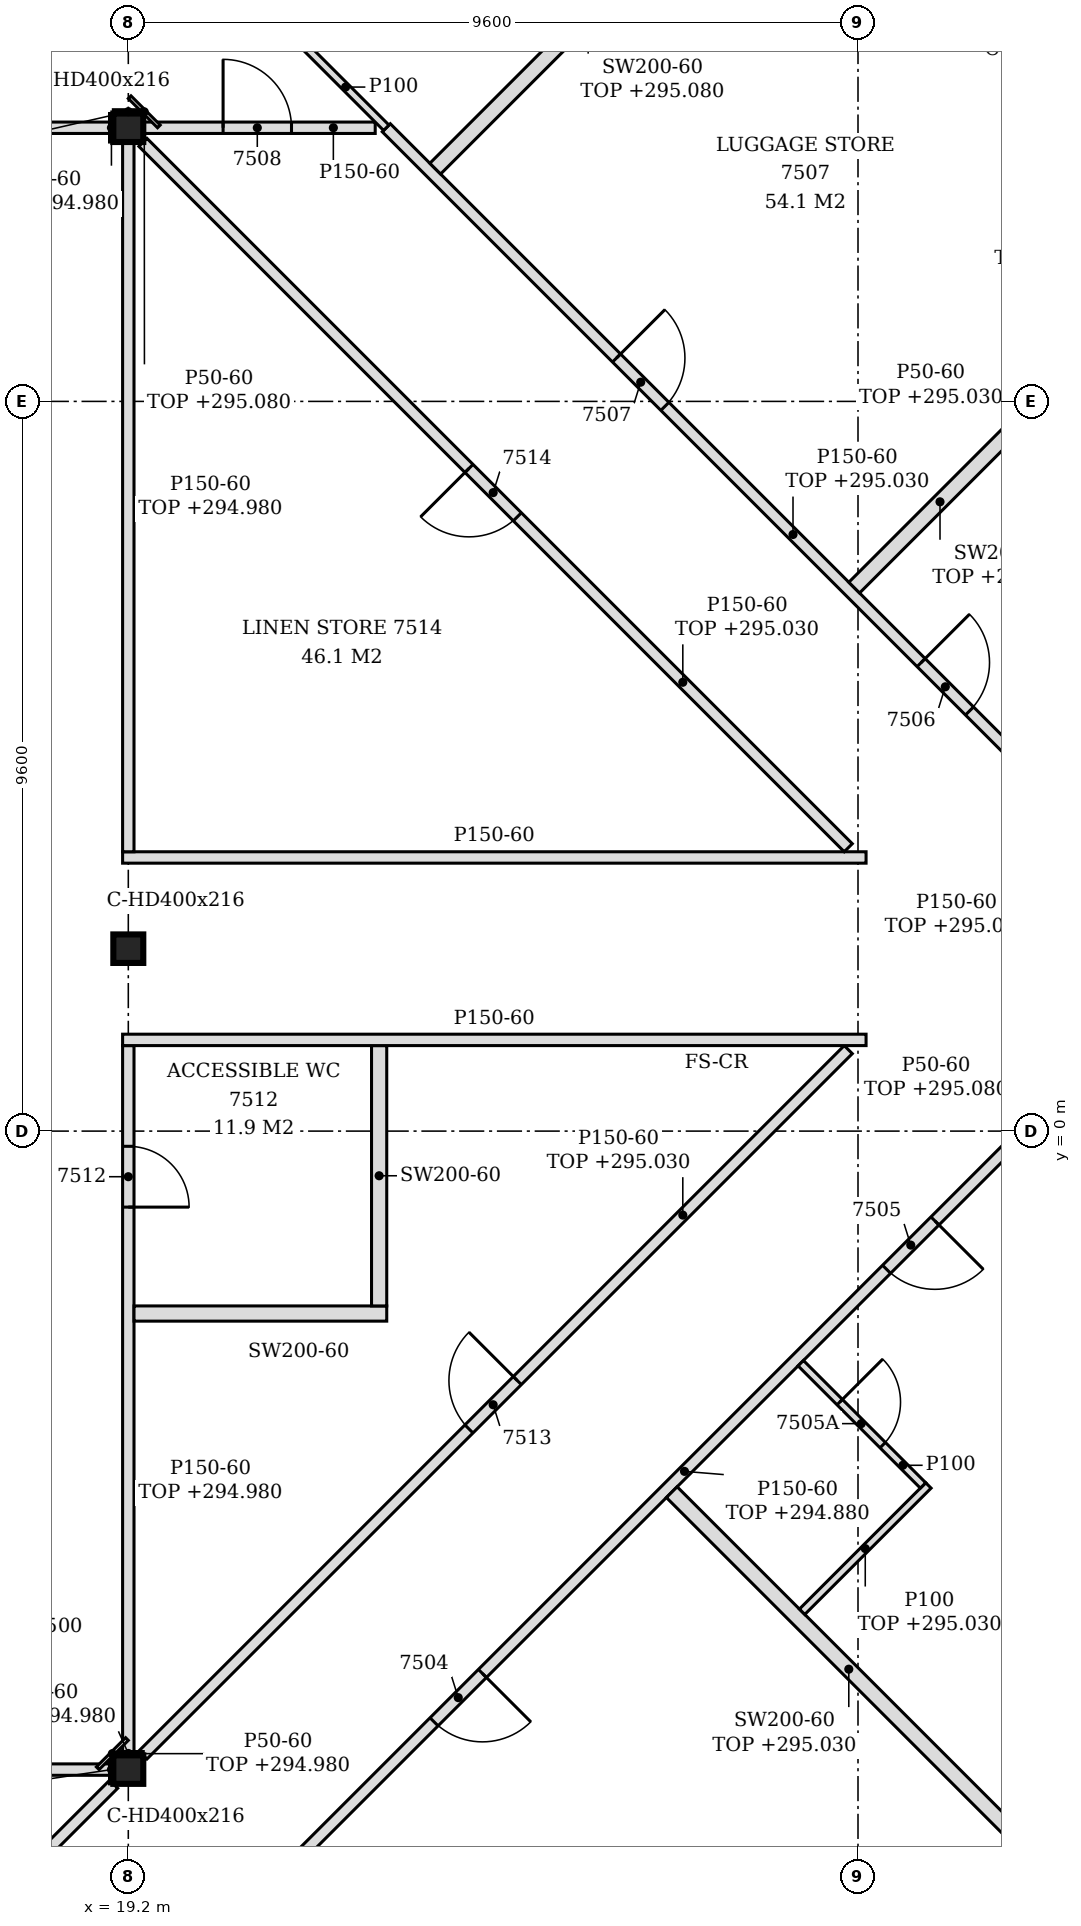
"""IFC4 building model, lengths in metres.
Left out: names, types, materials, properties, quantities, classifications, styles, units other than length and angle.
Written with IfcOpenShell. Run it as: python <this file> out.ifc"""

import sys

from ifc_helpers import new_model, si_unit, direction, frame, frame_2d, origin, origin_2d, place, context, subcontext, project, spatial, polyline, rectangle, i_section, outline, extrude, element, fill, save


model = new_model("IFC4")
c1 = context("Model", 3, precision=1e-05, world=origin(), true_north=direction((0.0, 1.0)))
c2 = subcontext(c1, "Body", "Model", "MODEL_VIEW")
j1 = project(units=[si_unit("LENGTHUNIT", "METRE"), si_unit("PLANEANGLEUNIT", "RADIAN")], contexts=[c1])
p1 = place(None, origin())
s1 = spatial("IfcSite", under=j1, at=p1, CompositionType="ELEMENT")
p2 = place(p1, origin())
s2 = spatial("IfcBuilding", under=s1, at=p2, CompositionType="ELEMENT")
p3 = place(p2, frame((0.0, 0.0, 292.2)))
s3 = spatial("IfcBuildingStorey", under=s2, at=p3, CompositionType="ELEMENT", Elevation=292.2)
for number, where, z_axis, x_axis in (
    (1, (19.2, -8.4, -0.15), (0.0, 0.0, 1.0), (1.0, 0.0, 0.0)),
    (2, (19.2, 2.4, -0.15), (0.0, 0.0, 1.0), (1.0, 0.0, 0.0)),
    (3, (19.2, 13.2, -0.15), (0.0, 0.0, 1.0), (1.0, 0.0, 0.0)),
):
    element("IfcColumn", number, at=place(p3, frame(where, z_axis=z_axis, x_axis=x_axis)), inside=s3, PredefinedType="COLUMN", context=c2, shape_type="SweptSolid", body=[
        extrude(i_section(OverallWidth=0.394, OverallDepth=0.375, WebThickness=0.017, FlangeThickness=0.028, FilletRadius=0.015, at=origin_2d()), origin(), (0.0, 0.0, 1.0), 3.55),
    ])
p4 = place(p3, frame((16.722, -14.272, 0.0), z_axis=(0.0, 0.0, 1.0), x_axis=(0.707106781187, 0.707106781187, 0.0)))
e4 = element("IfcWall", 4, at=p4, inside=s3, PredefinedType="PARTITIONING", context=c2, shape_type="SweptSolid", body=[
    extrude(rectangle(XDim=20.058, YDim=0.15, at=frame_2d((10.029, 0.0))), origin(), (0.0, 0.0, 1.0), 2.68),
])
p5 = place(p4, frame((3.195, 0.0, 0.0)))
e5 = element("IfcOpeningElement", 5, at=p5, cuts=e4, PredefinedType="OPENING", context=c2, shape_type="SweptSolid", body=[
    extrude(rectangle(XDim=0.9, YDim=2.1, at=frame_2d((0.45, 1.05))), frame((0.0, 0.085, 0.0), z_axis=(0.0, -1.0, 0.0), x_axis=(1.0, 0.0, 0.0)), (0.0, 0.0, 1.0), 0.17),
])
p6 = place(p4, frame((9.193, 0.0, 0.0)))
e6 = element("IfcOpeningElement", 6, at=p6, cuts=e4, PredefinedType="OPENING", context=c2, shape_type="SweptSolid", body=[
    extrude(rectangle(XDim=0.9, YDim=2.1, at=frame_2d((0.45, 1.05))), frame((0.0, 0.085, 0.0), z_axis=(0.0, -1.0, 0.0), x_axis=(1.0, 0.0, 0.0)), (0.0, 0.0, 1.0), 0.17),
])
p7 = place(p4, frame((17.613, 0.0, 0.0)))
e7 = element("IfcOpeningElement", 7, at=p7, cuts=e4, PredefinedType="OPENING", context=c2, shape_type="SweptSolid", body=[
    extrude(rectangle(XDim=0.9, YDim=2.1, at=frame_2d((0.45, 1.05))), frame((0.0, 0.085, 0.0), z_axis=(0.0, -1.0, 0.0), x_axis=(1.0, 0.0, 0.0)), (0.0, 0.0, 1.0), 0.17),
])
p8 = place(p3, frame((15.728, -11.872, 0.0), z_axis=(0.0, 0.0, 1.0), x_axis=(0.707106781187, 0.707106781187, 0.0)))
e8 = element("IfcWall", 8, at=p8, inside=s3, PredefinedType="PARTITIONING", context=c2, shape_type="SweptSolid", body=[
    extrude(rectangle(XDim=4.638, YDim=0.15, at=frame_2d((2.319, 0.0))), origin(), (0.0, 0.0, 1.0), 3.4),
])
p9 = place(p3, frame((31.008, -9.408, 0.0), z_axis=(0.0, 0.0, 1.0), x_axis=(-0.707106781187, 0.707106781187, 0.0)))
e9 = element("IfcWall", 9, at=p9, inside=s3, PredefinedType="PARTITIONING", context=c2, shape_type="SweptSolid", body=[
    extrude(rectangle(XDim=6.587, YDim=0.2, at=frame_2d((3.293, 0.0))), origin(), (0.0, 0.0, 1.0), 2.83),
])
p10 = place(p3, frame((7.397, -8.4, 0.0), z_axis=(0.0, 0.0, 1.0), x_axis=(1.0, 0.0, 0.0)))
e10 = element("IfcWall", 10, at=p10, inside=s3, PredefinedType="PARTITIONING", context=c2, shape_type="SweptSolid", body=[
    extrude(rectangle(XDim=11.606, YDim=0.15, at=frame_2d((5.803, 0.0))), origin(), (0.0, 0.0, 1.0), 2.78),
])
p11 = place(p10, frame((5.353, 0.0, 0.0)))
e11 = element("IfcOpeningElement", 11, at=p11, cuts=e10, PredefinedType="OPENING", context=c2, shape_type="SweptSolid", body=[
    extrude(rectangle(XDim=0.9, YDim=2.1, at=frame_2d((0.45, 1.05))), frame((0.0, 0.085, 0.0), z_axis=(0.0, -1.0, 0.0), x_axis=(1.0, 0.0, 0.0)), (0.0, 0.0, 1.0), 0.17),
])
p12 = place(p3, frame((19.2, -8.212, 0.0), z_axis=(0.0, 0.0, 1.0), x_axis=(0.0, 1.0, 0.0)))
e12 = element("IfcWall", 12, at=p12, inside=s3, PredefinedType="PARTITIONING", context=c2, shape_type="SweptSolid", body=[
    extrude(rectangle(XDim=9.337, YDim=0.15, at=frame_2d((4.669, 0.0))), origin(), (0.0, 0.0, 1.0), 2.78),
])
p13 = place(p12, frame((7.213, 0.0, 0.0)))
e13 = element("IfcOpeningElement", 13, at=p13, cuts=e12, PredefinedType="OPENING", context=c2, shape_type="SweptSolid", body=[
    extrude(rectangle(XDim=0.8, YDim=2.1, at=frame_2d((0.4, 1.05))), frame((0.0, 0.085, 0.0), z_axis=(0.0, -1.0, 0.0), x_axis=(1.0, 0.0, 0.0)), (0.0, 0.0, 1.0), 0.17),
])
p14 = place(p3, frame((19.392, -8.208, 0.0), z_axis=(0.0, 0.0, 1.0), x_axis=(0.707106781187, 0.707106781187, 0.0)))
e14 = element("IfcWall", 14, at=p14, inside=s3, PredefinedType="PARTITIONING", context=c2, shape_type="SweptSolid", body=[
    extrude(rectangle(XDim=13.124, YDim=0.15, at=frame_2d((6.562, 0.0))), origin(), (0.0, 0.0, 1.0), 2.83),
])
p15 = place(p14, frame((6.066, 0.0, 0.0)))
e15 = element("IfcOpeningElement", 15, at=p15, cuts=e14, PredefinedType="OPENING", context=c2, shape_type="SweptSolid", body=[
    extrude(rectangle(XDim=0.9, YDim=2.1, at=frame_2d((0.45, 1.05))), frame((0.0, 0.085, 0.0), z_axis=(0.0, -1.0, 0.0), x_axis=(1.0, 0.0, 0.0)), (0.0, 0.0, 1.0), 0.17),
])
p16 = place(p3, frame((28.065, -6.323, 0.0), z_axis=(0.0, 0.0, 1.0), x_axis=(0.707106781187, 0.707106781187, 0.0)))
e16 = element("IfcWall", 16, at=p16, inside=s3, PredefinedType="PARTITIONING", context=c2, shape_type="SweptSolid", body=[
    extrude(rectangle(XDim=2.35, YDim=0.1, at=frame_2d((1.175, 0.0))), origin(), (0.0, 0.0, 1.0), 2.83),
])
p17 = place(p3, frame((29.656, -4.662, 0.0), z_axis=(0.0, 0.0, 1.0), x_axis=(-0.707053116953, 0.707160441348, 0.0)))
e17 = element("IfcWall", 17, at=p17, inside=s3, PredefinedType="PARTITIONING", context=c2, shape_type="SweptSolid", body=[
    extrude(rectangle(XDim=2.275, YDim=0.1, at=frame_2d((1.137, 0.0))), origin(), (0.0, 0.0, 1.0), 3.4),
])
p18 = place(p17, frame((0.75, 0.0, 0.0)))
e18 = element("IfcOpeningElement", 18, at=p18, cuts=e17, PredefinedType="OPENING", context=c2, shape_type="SweptSolid", body=[
    extrude(rectangle(XDim=0.8, YDim=2.1, at=frame_2d((0.4, 1.05))), frame((0.0, 0.06, 0.0), z_axis=(0.0, -1.0, 0.0), x_axis=(1.0, 0.0, 0.0)), (0.0, 0.0, 1.0), 0.12),
])
p19 = place(p3, frame((19.275, -2.4, 0.0), z_axis=(0.0, 0.0, 1.0), x_axis=(1.0, 0.0, 0.0)))
e19 = element("IfcWall", 19, at=p19, inside=s3, PredefinedType="PARTITIONING", context=c2, shape_type="SweptSolid", body=[
    extrude(outline(polyline([(0.0, 0.0), (3.325, 0.0), (3.325, 3.4), (0.075, 3.4), (0.073, 2.78), (0.0, 2.78), (0.0, 0.0)])), frame((0.0, 0.1, 0.0), z_axis=(0.0, -1.0, 0.0), x_axis=(1.0, 0.0, 0.0)), (0.0, 0.0, 1.0), 0.2),
])
p20 = place(p3, frame((22.5, -2.3, 0.0), z_axis=(0.0, 0.0, 1.0), x_axis=(0.0, 1.0, 0.0)))
e20 = element("IfcWall", 20, at=p20, inside=s3, PredefinedType="PARTITIONING", context=c2, shape_type="SweptSolid", body=[
    extrude(outline(polyline([(0.0, 0.0), (3.425, 0.0), (3.425, 3.4), (2.405, 3.4), (2.403, 2.83), (2.195, 2.83), (2.193, 3.4), (0.0, 3.4), (0.0, 0.0)])), frame((0.0, 0.1, 0.0), z_axis=(0.0, -1.0, 0.0), x_axis=(1.0, 0.0, 0.0)), (0.0, 0.0, 1.0), 0.2),
])
for number, where, z_axis, x_axis in (
    (21, (19.125, 1.2, 0.0), (0.0, 0.0, 1.0), (1.0, 0.0, 0.0)),
    (22, (19.125, 3.6, 0.0), (0.0, 0.0, 1.0), (1.0, 0.0, 0.0)),
):
    element("IfcWall", number, at=place(p3, frame(where, z_axis=z_axis, x_axis=x_axis)), inside=s3, PredefinedType="PARTITIONING", context=c2, shape_type="SweptSolid", body=[
        extrude(outline(polyline([(0.0, 0.0), (9.781, 0.0), (9.781, 3.4), (0.225, 3.4), (0.223, 2.78), (0.0, 2.78), (0.0, 0.0)])), frame((0.0, 0.075, 0.0), z_axis=(0.0, -1.0, 0.0), x_axis=(1.0, 0.0, 0.0)), (0.0, 0.0, 1.0), 0.15),
    ])
p21 = place(p3, frame((19.2, 3.675, 0.0), z_axis=(0.0, 0.0, 1.0), x_axis=(0.0, 1.0, 0.0)))
e23 = element("IfcWall", 23, at=p21, inside=s3, PredefinedType="PARTITIONING", context=c2, shape_type="SweptSolid", body=[
    extrude(rectangle(XDim=9.337, YDim=0.15, at=frame_2d((4.669, 0.0))), origin(), (0.0, 0.0, 1.0), 2.78),
])
p22 = place(p3, frame((28.672, 3.728, 0.0), z_axis=(0.0, 0.0, 1.0), x_axis=(-0.707106781187, 0.707106781187, 0.0)))
e24 = element("IfcWall", 24, at=p22, inside=s3, PredefinedType="PARTITIONING", context=c2, shape_type="SweptSolid", body=[
    extrude(rectangle(XDim=13.124, YDim=0.15, at=frame_2d((6.562, 0.0))), origin(), (0.0, 0.0, 1.0), 2.83),
])
p23 = place(p22, frame((6.157, 0.0, 0.0)))
e25 = element("IfcOpeningElement", 25, at=p23, cuts=e24, PredefinedType="OPENING", context=c2, shape_type="SweptSolid", body=[
    extrude(rectangle(XDim=0.9, YDim=2.1, at=frame_2d((0.45, 1.05))), frame((0.0, 0.085, 0.0), z_axis=(0.0, -1.0, 0.0), x_axis=(1.0, 0.0, 0.0)), (0.0, 0.0, 1.0), 0.17),
])
p24 = place(p3, frame((31.072, 4.722, 0.0), z_axis=(0.0, 0.0, 1.0), x_axis=(-0.707106781187, 0.707106781187, 0.0)))
e26 = element("IfcWall", 26, at=p24, inside=s3, PredefinedType="PARTITIONING", context=c2, shape_type="SweptSolid", body=[
    extrude(rectangle(XDim=11.99, YDim=0.15, at=frame_2d((5.995, 0.0))), origin(), (0.0, 0.0, 1.0), 2.83),
])
p25 = place(p24, frame((1.139, 0.0, 0.0)))
e27 = element("IfcOpeningElement", 27, at=p25, cuts=e26, PredefinedType="OPENING", context=c2, shape_type="SweptSolid", body=[
    extrude(rectangle(XDim=0.9, YDim=2.1, at=frame_2d((0.45, 1.05))), frame((0.0, 0.085, 0.0), z_axis=(0.0, -1.0, 0.0), x_axis=(1.0, 0.0, 0.0)), (0.0, 0.0, 1.0), 0.17),
])
p26 = place(p24, frame((6.806, 0.0, 0.0)))
e28 = element("IfcOpeningElement", 28, at=p26, cuts=e26, PredefinedType="OPENING", context=c2, shape_type="SweptSolid", body=[
    extrude(rectangle(XDim=0.9, YDim=2.1, at=frame_2d((0.45, 1.05))), frame((0.0, 0.085, 0.0), z_axis=(0.0, -1.0, 0.0), x_axis=(1.0, 0.0, 0.0)), (0.0, 0.0, 1.0), 0.17),
])
p27 = place(p3, frame((28.75, 7.15, 0.0), z_axis=(0.0, 0.0, 1.0), x_axis=(0.707106781187, 0.707106781187, 0.0)))
e29 = element("IfcWall", 29, at=p27, inside=s3, PredefinedType="PARTITIONING", context=c2, shape_type="SweptSolid", body=[
    extrude(rectangle(XDim=3.193, YDim=0.2, at=frame_2d((1.597, 0.0))), origin(), (0.0, 0.0, 1.0), 2.88),
])
p28 = place(p3, frame((23.238, 12.662, 0.0), z_axis=(0.0, 0.0, 1.0), x_axis=(0.707106781187, 0.707106781187, 0.0)))
e30 = element("IfcWall", 30, at=p28, inside=s3, PredefinedType="PARTITIONING", context=c2, shape_type="SweptSolid", body=[
    extrude(rectangle(XDim=5.69, YDim=0.2, at=frame_2d((2.845, 0.0))), origin(), (0.0, 0.0, 1.0), 2.88),
])
p29 = place(p3, frame((7.397, 13.2, 0.0), z_axis=(0.0, 0.0, 1.0), x_axis=(1.0, 0.0, 0.0)))
e31 = element("IfcWall", 31, at=p29, inside=s3, PredefinedType="PARTITIONING", context=c2, shape_type="SweptSolid", body=[
    extrude(rectangle(XDim=11.606, YDim=0.15, at=frame_2d((5.803, 0.0))), origin(), (0.0, 0.0, 1.0), 2.78),
])
p30 = place(p29, frame((4.103, 0.0, 0.0)))
e32 = element("IfcOpeningElement", 32, at=p30, cuts=e31, PredefinedType="OPENING", context=c2, shape_type="SweptSolid", body=[
    extrude(rectangle(XDim=1.8, YDim=2.1, at=frame_2d((0.9, 1.05))), frame((0.0, 0.085, 0.0), z_axis=(0.0, -1.0, 0.0), x_axis=(1.0, 0.0, 0.0)), (0.0, 0.0, 1.0), 0.17),
])
p31 = place(p29, frame((6.053, 0.0, 0.0)))
e33 = element("IfcOpeningElement", 33, at=p31, cuts=e31, PredefinedType="OPENING", context=c2, shape_type="SweptSolid", body=[
    extrude(rectangle(XDim=1.0, YDim=2.1, at=frame_2d((0.5, 1.05))), frame((0.0, 0.085, 0.0), z_axis=(0.0, -1.0, 0.0), x_axis=(1.0, 0.0, 0.0)), (0.0, 0.0, 1.0), 0.17),
])
p32 = place(p3, frame((19.397, 13.2, 0.0), z_axis=(0.0, 0.0, 1.0), x_axis=(1.0, 0.0, 0.0)))
e34 = element("IfcWall", 34, at=p32, inside=s3, PredefinedType="PARTITIONING", context=c2, shape_type="SweptSolid", body=[
    extrude(rectangle(XDim=3.051, YDim=0.15, at=frame_2d((1.526, 0.0))), origin(), (0.0, 0.0, 1.0), 3.4),
])
p33 = place(p32, frame((1.05, 0.0, 0.0)))
e35 = element("IfcOpeningElement", 35, at=p33, cuts=e34, PredefinedType="OPENING", context=c2, shape_type="SweptSolid", body=[
    extrude(rectangle(XDim=0.9, YDim=2.1, at=frame_2d((0.45, 1.05))), frame((0.0, 0.085, 0.0), z_axis=(0.0, -1.0, 0.0), x_axis=(1.0, 0.0, 0.0)), (0.0, 0.0, 1.0), 0.17),
])
p34 = place(p3, frame((22.594, 13.2, 0.0), z_axis=(0.0, 0.0, 1.0), x_axis=(-0.707106781187, 0.707106781187, 0.0)))
e36 = element("IfcWall", 36, at=p34, inside=s3, PredefinedType="PARTITIONING", context=c2, shape_type="SweptSolid", body=[
    extrude(rectangle(XDim=1.514, YDim=0.1, at=frame_2d((0.757, 0.0))), origin(), (0.0, 0.0, 1.0), 3.4),
])
p35 = place(p3, frame((18.798, -8.382, 0.0), z_axis=(0.0, 0.0, 1.0), x_axis=(0.707106781187, 0.707106781187, 0.0)))
e37 = element("IfcWall", 37, at=p35, inside=s3, PredefinedType="PARTITIONING", context=c2, shape_type="SweptSolid", body=[
    extrude(rectangle(XDim=0.544, YDim=0.05, at=frame_2d((0.272, 0.0))), origin(), (0.0, 0.0, 1.0), 2.78),
])
p36 = place(p3, frame((19.003, -8.188, 0.0), z_axis=(0.0, 0.0, 1.0), x_axis=(1.0, 0.0, 0.0)))
e38 = element("IfcWall", 38, at=p36, inside=s3, PredefinedType="PARTITIONING", context=c2, shape_type="SweptSolid", body=[
    extrude(rectangle(XDim=0.394, YDim=0.05, at=frame_2d((0.197, 0.0))), origin(), (0.0, 0.0, 1.0), 2.78),
])
for number, where, z_axis, x_axis in (
    (39, (18.978, -8.587, 0.0), (0.0, 0.0, 1.0), (0.0, 1.0, 0.0)),
    (40, (18.978, 13.012, 0.0), (0.0, 0.0, 1.0), (0.0, 1.0, 0.0)),
):
    element("IfcWall", number, at=place(p3, frame(where, z_axis=z_axis, x_axis=x_axis)), inside=s3, PredefinedType="PARTITIONING", context=c2, shape_type="SweptSolid", body=[
        extrude(rectangle(XDim=0.375, YDim=0.05, at=frame_2d((0.188, 0.0))), origin(), (0.0, 0.0, 1.0), 2.78),
    ])
p37 = place(p3, frame((19.602, 13.218, 0.0), z_axis=(0.0, 0.0, 1.0), x_axis=(-0.707106781187, 0.707106781187, 0.0)))
e41 = element("IfcWall", 41, at=p37, inside=s3, PredefinedType="PARTITIONING", context=c2, shape_type="SweptSolid", body=[
    extrude(rectangle(XDim=0.544, YDim=0.05, at=frame_2d((0.272, 0.0))), origin(), (0.0, 0.0, 1.0), 2.88),
])
p38 = place(p3, frame((19.003, 13.413, 0.0), z_axis=(0.0, 0.0, 1.0), x_axis=(1.0, 0.0, 0.0)))
e42 = element("IfcWall", 42, at=p38, inside=s3, PredefinedType="PARTITIONING", context=c2, shape_type="SweptSolid", body=[
    extrude(rectangle(XDim=0.394, YDim=0.05, at=frame_2d((0.197, 0.0))), origin(), (0.0, 0.0, 1.0), 2.88),
])
p39 = place(p6, frame((0.9, 0.0, 0.0), z_axis=(0.0, 0.0, 1.0), x_axis=(-1.0, 0.0, 0.0)))
e43 = element("IfcDoor", 43, at=p39, inside=s3, OperationType="SINGLE_SWING_LEFT", PredefinedType="DOOR", context=c2, shape_type="SweptSolid", body=[
    extrude(rectangle(XDim=0.9, YDim=2.1, at=frame_2d((0.45, 1.05))), frame((0.0, 0.025, 0.0), z_axis=(0.0, -1.0, 0.0), x_axis=(1.0, 0.0, 0.0)), (0.0, 0.0, 1.0), 0.05),
])
fill(e6, e43)
p40 = place(p7, frame((0.9, 0.0, 0.0), z_axis=(0.0, 0.0, 1.0), x_axis=(-1.0, 0.0, 0.0)))
e44 = element("IfcDoor", 44, at=p40, inside=s3, OperationType="SINGLE_SWING_LEFT", PredefinedType="DOOR", context=c2, shape_type="SweptSolid", body=[
    extrude(rectangle(XDim=0.9, YDim=2.1, at=frame_2d((0.45, 1.05))), frame((0.0, 0.025, 0.0), z_axis=(0.0, -1.0, 0.0), x_axis=(1.0, 0.0, 0.0)), (0.0, 0.0, 1.0), 0.05),
])
fill(e7, e44)
p41 = place(p18, frame((0.8, 0.0, 0.0), z_axis=(0.0, 0.0, 1.0), x_axis=(-1.0, 0.0, 0.0)))
e45 = element("IfcDoor", 45, at=p41, inside=s3, OperationType="SINGLE_SWING_LEFT", PredefinedType="DOOR", context=c2, shape_type="SweptSolid", body=[
    extrude(rectangle(XDim=0.8, YDim=2.1, at=frame_2d((0.4, 1.05))), frame((0.0, 0.025, 0.0), z_axis=(0.0, -1.0, 0.0), x_axis=(1.0, 0.0, 0.0)), (0.0, 0.0, 1.0), 0.05),
])
fill(e18, e45)
p42 = place(p25, frame((0.9, 0.0, 0.0), z_axis=(0.0, 0.0, 1.0), x_axis=(-1.0, 0.0, 0.0)))
e46 = element("IfcDoor", 46, at=p42, inside=s3, OperationType="SINGLE_SWING_LEFT", PredefinedType="DOOR", context=c2, shape_type="SweptSolid", body=[
    extrude(rectangle(XDim=0.9, YDim=2.1, at=frame_2d((0.45, 1.05))), frame((0.0, 0.025, 0.0), z_axis=(0.0, -1.0, 0.0), x_axis=(1.0, 0.0, 0.0)), (0.0, 0.0, 1.0), 0.05),
])
fill(e27, e46)
p43 = place(p26, frame((0.9, 0.0, 0.0), z_axis=(0.0, 0.0, 1.0), x_axis=(-1.0, 0.0, 0.0)))
e47 = element("IfcDoor", 47, at=p43, inside=s3, OperationType="SINGLE_SWING_LEFT", PredefinedType="DOOR", context=c2, shape_type="SweptSolid", body=[
    extrude(rectangle(XDim=0.9, YDim=2.1, at=frame_2d((0.45, 1.05))), frame((0.0, 0.025, 0.0), z_axis=(0.0, -1.0, 0.0), x_axis=(1.0, 0.0, 0.0)), (0.0, 0.0, 1.0), 0.05),
])
fill(e28, e47)
p44 = place(p33, origin())
e48 = element("IfcDoor", 48, at=p44, inside=s3, OperationType="SINGLE_SWING_LEFT", PredefinedType="DOOR", context=c2, shape_type="SweptSolid", body=[
    extrude(rectangle(XDim=0.9, YDim=2.1, at=frame_2d((0.45, 1.05))), frame((0.0, 0.025, 0.0), z_axis=(0.0, -1.0, 0.0), x_axis=(1.0, 0.0, 0.0)), (0.0, 0.0, 1.0), 0.05),
])
fill(e35, e48)
p45 = place(p13, frame((0.8, 0.0, 0.0), z_axis=(0.0, 0.0, 1.0), x_axis=(-1.0, 0.0, 0.0)))
e49 = element("IfcDoor", 49, at=p45, inside=s3, OperationType="SINGLE_SWING_RIGHT", PredefinedType="DOOR", context=c2, shape_type="SweptSolid", body=[
    extrude(rectangle(XDim=0.8, YDim=2.1, at=frame_2d((0.4, 1.05))), frame((0.0, 0.025, 0.0), z_axis=(0.0, -1.0, 0.0), x_axis=(1.0, 0.0, 0.0)), (0.0, 0.0, 1.0), 0.05),
])
fill(e13, e49)
p46 = place(p15, origin())
e50 = element("IfcDoor", 50, at=p46, inside=s3, OperationType="SINGLE_SWING_RIGHT", PredefinedType="DOOR", context=c2, shape_type="SweptSolid", body=[
    extrude(rectangle(XDim=0.9, YDim=2.1, at=frame_2d((0.45, 1.05))), frame((0.0, 0.025, 0.0), z_axis=(0.0, -1.0, 0.0), x_axis=(1.0, 0.0, 0.0)), (0.0, 0.0, 1.0), 0.05),
])
fill(e15, e50)
p47 = place(p23, origin())
e51 = element("IfcDoor", 51, at=p47, inside=s3, OperationType="SINGLE_SWING_RIGHT", PredefinedType="DOOR", context=c2, shape_type="SweptSolid", body=[
    extrude(rectangle(XDim=0.9, YDim=2.1, at=frame_2d((0.45, 1.05))), frame((0.0, 0.025, 0.0), z_axis=(0.0, -1.0, 0.0), x_axis=(1.0, 0.0, 0.0)), (0.0, 0.0, 1.0), 0.05),
])
fill(e25, e51)
save(model, sys.argv[1])
